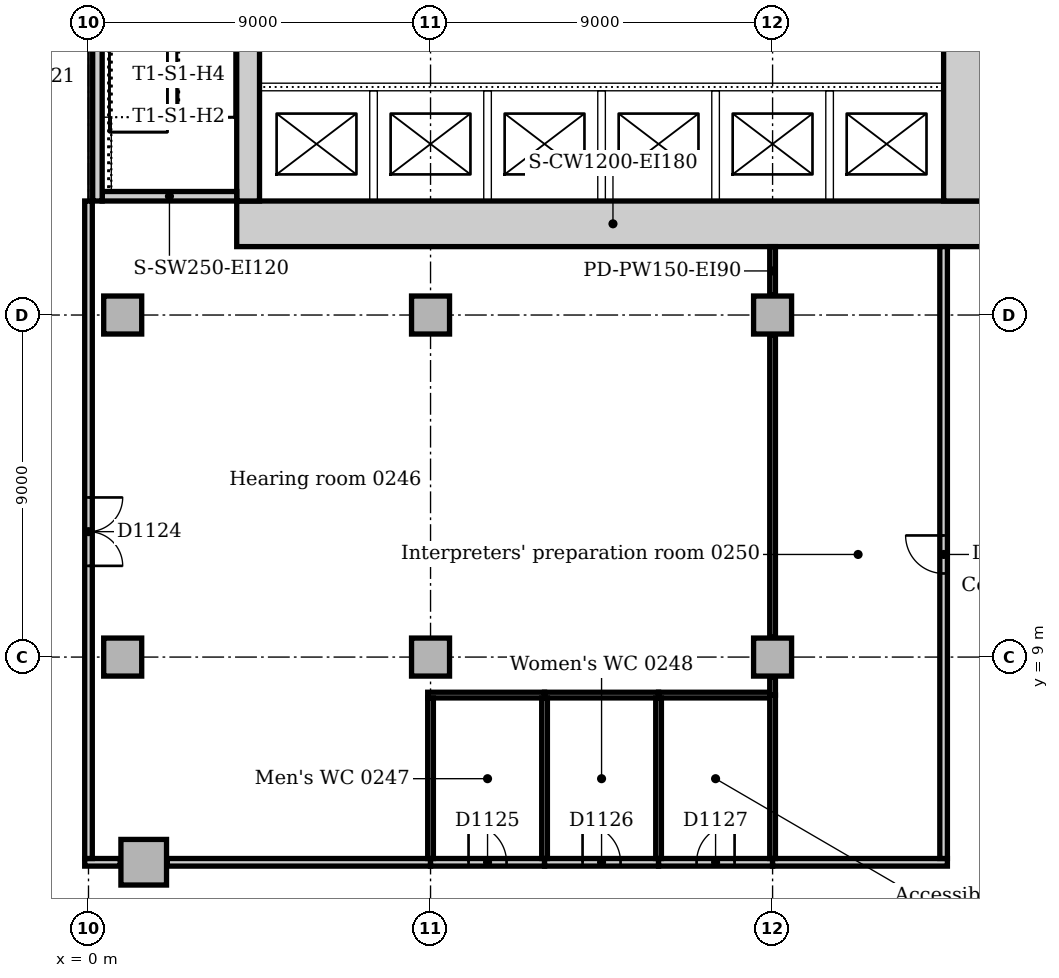
"""IFC4 building model, lengths in metres.
Left out: names, types, materials, properties, quantities, classifications, styles, units other than length and angle.
Written with IfcOpenShell. Run it as: python <this file> out.ifc"""

import sys

from ifc_helpers import new_model, si_unit, direction, frame, frame_2d, origin, origin_2d, place, context, subcontext, project, spatial, rectangle, extrude, element, fill, save


model = new_model("IFC4")
c1 = context("Model", 3, precision=1e-05, world=origin(), true_north=direction((0.0, 1.0)))
c2 = subcontext(c1, "Body", "Model", "MODEL_VIEW")
j1 = project(units=[si_unit("LENGTHUNIT", "METRE"), si_unit("PLANEANGLEUNIT", "RADIAN")], contexts=[c1])
p1 = place(None, origin())
s1 = spatial("IfcSite", under=j1, at=p1, CompositionType="ELEMENT")
p2 = place(p1, origin())
s2 = spatial("IfcBuilding", under=s1, at=p2, CompositionType="ELEMENT")
p3 = place(p2, frame((0.0, 0.0, 11.0)))
s3 = spatial("IfcBuildingStorey", under=s2, at=p3, CompositionType="ELEMENT", Elevation=11.0)
p4 = place(p3, frame((3.9, 20.4, 0.0), z_axis=(0.0, 0.0, 1.0), x_axis=(1.0, 0.0, 0.0)))
e1 = element("IfcWall", 1, at=p4, inside=s3, PredefinedType="SOLIDWALL", context=c2, shape_type="SweptSolid", body=[
    extrude(rectangle(XDim=19.8, YDim=1.2, at=frame_2d((9.9, 0.0))), origin(), (0.0, 0.0, 1.0), 5.0),
])
p5 = place(p3, frame((23.1, 21.0, 0.0), z_axis=(0.0, 0.0, 1.0), x_axis=(0.0, 1.0, 0.0)))
e2 = element("IfcWall", 2, at=p5, inside=s3, PredefinedType="SOLIDWALL", context=c2, shape_type="SweptSolid", body=[
    extrude(rectangle(XDim=10.5, YDim=1.2, at=frame_2d((5.25, 0.0))), origin(), (0.0, 0.0, 1.0), 5.0),
])
p6 = place(p5, frame((4.35, 0.0, 0.0)))
e3 = element("IfcOpeningElement", 3, at=p6, cuts=e2, PredefinedType="OPENING", context=c2, shape_type="SweptSolid", body=[
    extrude(rectangle(XDim=1.8, YDim=2.1, at=frame_2d((0.9, 1.05))), frame((0.0, 0.61, 0.0), z_axis=(0.0, -1.0, 0.0), x_axis=(1.0, 0.0, 0.0)), (0.0, 0.0, 1.0), 1.22),
])
p7 = place(p3, frame((4.2, 31.5, 0.0), z_axis=(0.0, 0.0, 1.0), x_axis=(0.0, -1.0, 0.0)))
e4 = element("IfcWall", 4, at=p7, inside=s3, PredefinedType="SOLIDWALL", context=c2, shape_type="SweptSolid", body=[
    extrude(rectangle(XDim=10.5, YDim=0.6, at=frame_2d((5.25, 0.0))), origin(), (0.0, 0.0, 1.0), 5.0),
])
p8 = place(p7, frame((4.25, 0.0, 0.0)))
e5 = element("IfcOpeningElement", 5, at=p8, cuts=e4, PredefinedType="OPENING", context=c2, shape_type="SweptSolid", body=[
    extrude(rectangle(XDim=1.0, YDim=2.1, at=frame_2d((0.5, 1.05))), frame((0.0, 0.31, 0.0), z_axis=(0.0, -1.0, 0.0), x_axis=(1.0, 0.0, 0.0)), (0.0, 0.0, 1.0), 0.62),
])
p9 = place(p3, frame((0.36, 21.125, 0.0), z_axis=(0.0, 0.0, 1.0), x_axis=(1.0, 0.0, 0.0)))
e6 = element("IfcWall", 6, at=p9, inside=s3, PredefinedType="SOLIDWALL", context=c2, shape_type="SweptSolid", body=[
    extrude(rectangle(XDim=3.54, YDim=0.25, at=frame_2d((1.77, 0.0))), origin(), (0.0, 0.0, 1.0), 5.0),
])
p10 = place(p3, frame((0.235, 21.0, 0.0), z_axis=(0.0, 0.0, 1.0), x_axis=(0.0, 1.0, 0.0)))
e7 = element("IfcWall", 7, at=p10, inside=s3, PredefinedType="SOLIDWALL", context=c2, shape_type="SweptSolid", body=[
    extrude(rectangle(XDim=21.0, YDim=0.25, at=frame_2d((10.5, 0.0))), origin(), (0.0, 0.0, 1.0), 5.0),
])
p11 = place(p3, frame((1.453, 3.602, 0.0), z_axis=(0.0, 0.0, 1.0), x_axis=(1.0, 0.0, 0.0)))
e8 = element("IfcColumn", 8, at=p11, inside=s3, PredefinedType="COLUMN", context=c2, shape_type="SweptSolid", body=[
    extrude(rectangle(XDim=1.2, YDim=1.2, at=origin_2d()), origin(), (0.0, 0.0, 1.0), 4.7),
])
for number, where, z_axis, x_axis in (
    (9, (0.9, 9.0, 0.0), (0.0, 0.0, 1.0), (1.0, 0.0, 0.0)),
    (10, (0.9, 18.0, 0.0), (0.0, 0.0, 1.0), (1.0, 0.0, 0.0)),
    (11, (9.0, 9.0, 0.0), (0.0, 0.0, 1.0), (1.0, 0.0, 0.0)),
    (12, (9.0, 18.0, 0.0), (0.0, 0.0, 1.0), (1.0, 0.0, 0.0)),
    (13, (18.0, 9.0, 0.0), (0.0, 0.0, 1.0), (1.0, 0.0, 0.0)),
    (14, (18.0, 18.0, 0.0), (0.0, 0.0, 1.0), (1.0, 0.0, 0.0)),
):
    element("IfcColumn", number, at=place(p3, frame(where, z_axis=z_axis, x_axis=x_axis)), inside=s3, PredefinedType="COLUMN", context=c2, shape_type="SweptSolid", body=[
        extrude(rectangle(XDim=1.0, YDim=1.0, at=origin_2d()), origin(), (0.0, 0.0, 1.0), 4.7),
    ])
p12 = place(p3, frame((-0.1, 3.6, 0.0), z_axis=(0.0, 0.0, 1.0), x_axis=(1.0, 0.0, 0.0)))
e15 = element("IfcWall", 15, at=p12, inside=s3, PredefinedType="PARTITIONING", context=c2, shape_type="SweptSolid", body=[
    extrude(rectangle(XDim=0.933, YDim=0.2, at=frame_2d((0.467, 0.0))), origin(), (0.0, 0.0, 1.0), 4.7),
])
p13 = place(p3, frame((2.073, 3.6, 0.0), z_axis=(0.0, 0.0, 1.0), x_axis=(1.0, 0.0, 0.0)))
e16 = element("IfcWall", 16, at=p13, inside=s3, PredefinedType="PARTITIONING", context=c2, shape_type="SweptSolid", body=[
    extrude(rectangle(XDim=6.927, YDim=0.2, at=frame_2d((3.463, 0.0))), origin(), (0.0, 0.0, 1.0), 4.7),
])
p14 = place(p3, frame((9.0, 3.6, 0.0), z_axis=(0.0, 0.0, 1.0), x_axis=(1.0, 0.0, 0.0)))
e17 = element("IfcWall", 17, at=p14, inside=s3, PredefinedType="PARTITIONING", context=c2, shape_type="SweptSolid", body=[
    extrude(rectangle(XDim=3.0, YDim=0.2, at=frame_2d((1.5, 0.0))), origin(), (0.0, 0.0, 1.0), 4.7),
])
p15 = place(p14, frame((1.0, 0.0, 0.0)))
e18 = element("IfcOpeningElement", 18, at=p15, cuts=e17, PredefinedType="OPENING", context=c2, shape_type="SweptSolid", body=[
    extrude(rectangle(XDim=1.0, YDim=2.1, at=frame_2d((0.5, 1.05))), frame((0.0, 0.11, 0.0), z_axis=(0.0, -1.0, 0.0), x_axis=(1.0, 0.0, 0.0)), (0.0, 0.0, 1.0), 0.22),
])
p16 = place(p3, frame((12.0, 3.6, 0.0), z_axis=(0.0, 0.0, 1.0), x_axis=(1.0, 0.0, 0.0)))
e19 = element("IfcWall", 19, at=p16, inside=s3, PredefinedType="PARTITIONING", context=c2, shape_type="SweptSolid", body=[
    extrude(rectangle(XDim=3.0, YDim=0.2, at=frame_2d((1.5, 0.0))), origin(), (0.0, 0.0, 1.0), 4.7),
])
p17 = place(p16, frame((1.0, 0.0, 0.0)))
e20 = element("IfcOpeningElement", 20, at=p17, cuts=e19, PredefinedType="OPENING", context=c2, shape_type="SweptSolid", body=[
    extrude(rectangle(XDim=1.0, YDim=2.1, at=frame_2d((0.5, 1.05))), frame((0.0, 0.11, 0.0), z_axis=(0.0, -1.0, 0.0), x_axis=(1.0, 0.0, 0.0)), (0.0, 0.0, 1.0), 0.22),
])
p18 = place(p3, frame((15.0, 3.6, 0.0), z_axis=(0.0, 0.0, 1.0), x_axis=(1.0, 0.0, 0.0)))
e21 = element("IfcWall", 21, at=p18, inside=s3, PredefinedType="PARTITIONING", context=c2, shape_type="SweptSolid", body=[
    extrude(rectangle(XDim=3.0, YDim=0.2, at=frame_2d((1.5, 0.0))), origin(), (0.0, 0.0, 1.0), 4.7),
])
p19 = place(p18, frame((1.0, 0.0, 0.0)))
e22 = element("IfcOpeningElement", 22, at=p19, cuts=e21, PredefinedType="OPENING", context=c2, shape_type="SweptSolid", body=[
    extrude(rectangle(XDim=1.0, YDim=2.1, at=frame_2d((0.5, 1.05))), frame((0.0, 0.11, 0.0), z_axis=(0.0, -1.0, 0.0), x_axis=(1.0, 0.0, 0.0)), (0.0, 0.0, 1.0), 0.22),
])
p20 = place(p3, frame((18.0, 3.6, 0.0), z_axis=(0.0, 0.0, 1.0), x_axis=(1.0, 0.0, 0.0)))
e23 = element("IfcWall", 23, at=p20, inside=s3, PredefinedType="PARTITIONING", context=c2, shape_type="SweptSolid", body=[
    extrude(rectangle(XDim=4.6, YDim=0.2, at=frame_2d((2.3, 0.0))), origin(), (0.0, 0.0, 1.0), 4.7),
])
p21 = place(p3, frame((22.5, 3.7, 0.0), z_axis=(0.0, 0.0, 1.0), x_axis=(0.0, 1.0, 0.0)))
e24 = element("IfcWall", 24, at=p21, inside=s3, PredefinedType="PARTITIONING", context=c2, shape_type="SweptSolid", body=[
    extrude(rectangle(XDim=16.1, YDim=0.2, at=frame_2d((8.05, 0.0))), origin(), (0.0, 0.0, 1.0), 4.7),
])
p22 = place(p21, frame((7.5, 0.0, 0.0)))
e25 = element("IfcOpeningElement", 25, at=p22, cuts=e24, PredefinedType="OPENING", context=c2, shape_type="SweptSolid", body=[
    extrude(rectangle(XDim=1.0, YDim=2.1, at=frame_2d((0.5, 1.05))), frame((0.0, 0.11, 0.0), z_axis=(0.0, -1.0, 0.0), x_axis=(1.0, 0.0, 0.0)), (0.0, 0.0, 1.0), 0.22),
])
p23 = place(p3, frame((0.0, 3.7, 0.0), z_axis=(0.0, 0.0, 1.0), x_axis=(0.0, 1.0, 0.0)))
e26 = element("IfcWall", 26, at=p23, inside=s3, PredefinedType="PARTITIONING", context=c2, shape_type="SweptSolid", body=[
    extrude(rectangle(XDim=17.3, YDim=0.2, at=frame_2d((8.65, 0.0))), origin(), (0.0, 0.0, 1.0), 4.7),
])
p24 = place(p23, frame((7.7, 0.0, 0.0)))
e27 = element("IfcOpeningElement", 27, at=p24, cuts=e26, PredefinedType="OPENING", context=c2, shape_type="SweptSolid", body=[
    extrude(rectangle(XDim=1.8, YDim=2.1, at=frame_2d((0.9, 1.05))), frame((0.0, 0.11, 0.0), z_axis=(0.0, -1.0, 0.0), x_axis=(1.0, 0.0, 0.0)), (0.0, 0.0, 1.0), 0.22),
])
p25 = place(p3, frame((8.925, 8.0, 0.0), z_axis=(0.0, 0.0, 1.0), x_axis=(1.0, 0.0, 0.0)))
e28 = element("IfcWall", 28, at=p25, inside=s3, PredefinedType="PARTITIONING", context=c2, shape_type="SweptSolid", body=[
    extrude(rectangle(XDim=3.075, YDim=0.15, at=frame_2d((1.538, 0.0))), origin(), (0.0, 0.0, 1.0), 4.7),
])
p26 = place(p3, frame((9.0, 3.7, 0.0), z_axis=(0.0, 0.0, 1.0), x_axis=(0.0, 1.0, 0.0)))
e29 = element("IfcWall", 29, at=p26, inside=s3, PredefinedType="PARTITIONING", context=c2, shape_type="SweptSolid", body=[
    extrude(rectangle(XDim=4.225, YDim=0.15, at=frame_2d((2.112, 0.0))), origin(), (0.0, 0.0, 1.0), 4.7),
])
p27 = place(p3, frame((12.0, 8.0, 0.0), z_axis=(0.0, 0.0, 1.0), x_axis=(1.0, 0.0, 0.0)))
e30 = element("IfcWall", 30, at=p27, inside=s3, PredefinedType="PARTITIONING", context=c2, shape_type="SweptSolid", body=[
    extrude(rectangle(XDim=3.0, YDim=0.15, at=frame_2d((1.5, 0.0))), origin(), (0.0, 0.0, 1.0), 4.7),
])
p28 = place(p3, frame((15.0, 8.0, 0.0), z_axis=(0.0, 0.0, 1.0), x_axis=(1.0, 0.0, 0.0)))
e31 = element("IfcWall", 31, at=p28, inside=s3, PredefinedType="PARTITIONING", context=c2, shape_type="SweptSolid", body=[
    extrude(rectangle(XDim=2.925, YDim=0.15, at=frame_2d((1.462, 0.0))), origin(), (0.0, 0.0, 1.0), 4.7),
])
p29 = place(p3, frame((18.0, 8.0, 0.0), z_axis=(0.0, 0.0, 1.0), x_axis=(0.0, 1.0, 0.0)))
e32 = element("IfcWall", 32, at=p29, inside=s3, PredefinedType="PARTITIONING", context=c2, shape_type="SweptSolid", body=[
    extrude(rectangle(XDim=0.48, YDim=0.15, at=frame_2d((0.24, 0.0))), origin(), (0.0, 0.0, 1.0), 4.7),
])
p30 = place(p3, frame((18.0, 9.52, 0.0), z_axis=(0.0, 0.0, 1.0), x_axis=(0.0, 1.0, 0.0)))
e33 = element("IfcWall", 33, at=p30, inside=s3, PredefinedType="PARTITIONING", context=c2, shape_type="SweptSolid", body=[
    extrude(rectangle(XDim=7.96, YDim=0.15, at=frame_2d((3.98, 0.0))), origin(), (0.0, 0.0, 1.0), 4.7),
])
p31 = place(p3, frame((18.0, 18.52, 0.0), z_axis=(0.0, 0.0, 1.0), x_axis=(0.0, 1.0, 0.0)))
e34 = element("IfcWall", 34, at=p31, inside=s3, PredefinedType="PARTITIONING", context=c2, shape_type="SweptSolid", body=[
    extrude(rectangle(XDim=1.28, YDim=0.15, at=frame_2d((0.64, 0.0))), origin(), (0.0, 0.0, 1.0), 4.7),
])
for number, where, z_axis, x_axis in (
    (35, (12.0, 3.7, 0.0), (0.0, 0.0, 1.0), (0.0, 1.0, 0.0)),
    (36, (15.0, 3.7, 0.0), (0.0, 0.0, 1.0), (0.0, 1.0, 0.0)),
):
    element("IfcWall", number, at=place(p3, frame(where, z_axis=z_axis, x_axis=x_axis)), inside=s3, PredefinedType="PARTITIONING", context=c2, shape_type="SweptSolid", body=[
        extrude(rectangle(XDim=4.225, YDim=0.15, at=frame_2d((2.112, 0.0))), origin(), (0.0, 0.0, 1.0), 4.7),
    ])
p32 = place(p3, frame((18.0, 3.7, 0.0), z_axis=(0.0, 0.0, 1.0), x_axis=(0.0, 1.0, 0.0)))
e37 = element("IfcWall", 37, at=p32, inside=s3, PredefinedType="PARTITIONING", context=c2, shape_type="SweptSolid", body=[
    extrude(rectangle(XDim=4.3, YDim=0.15, at=frame_2d((2.15, 0.0))), origin(), (0.0, 0.0, 1.0), 4.7),
])
p33 = place(p3, frame((0.48, 21.25, 0.0), z_axis=(0.0, 0.0, 1.0), x_axis=(0.0, 1.0, 0.0)))
e38 = element("IfcWall", 38, at=p33, inside=s3, PredefinedType="STANDARD", context=c2, shape_type="SweptSolid", body=[
    extrude(rectangle(XDim=1.955, YDim=0.24, at=frame_2d((0.978, 0.0))), origin(), (0.0, 0.0, 1.0), 5.0),
])
p34 = place(p3, frame((4.5, 24.0, 0.0), z_axis=(0.0, 0.0, 1.0), x_axis=(1.0, 0.0, 0.0)))
e39 = element("IfcWall", 39, at=p34, inside=s3, PredefinedType="PARTITIONING", context=c2, shape_type="SweptSolid", body=[
    extrude(rectangle(XDim=18.0, YDim=0.2, at=frame_2d((9.0, 0.0))), origin(), (0.0, 0.0, 1.0), 4.7),
])
p35 = place(p34, frame((0.95, 0.0, 0.0)))
e40 = element("IfcOpeningElement", 40, at=p35, cuts=e39, PredefinedType="OPENING", context=c2, shape_type="SweptSolid", body=[
    extrude(rectangle(XDim=1.1, YDim=2.1, at=frame_2d((0.55, 1.05))), frame((0.0, 0.11, 0.0), z_axis=(0.0, -1.0, 0.0), x_axis=(1.0, 0.0, 0.0)), (0.0, 0.0, 1.0), 0.22),
])
p36 = place(p34, frame((3.95, 0.0, 0.0)))
e41 = element("IfcOpeningElement", 41, at=p36, cuts=e39, PredefinedType="OPENING", context=c2, shape_type="SweptSolid", body=[
    extrude(rectangle(XDim=1.1, YDim=2.1, at=frame_2d((0.55, 1.05))), frame((0.0, 0.11, 0.0), z_axis=(0.0, -1.0, 0.0), x_axis=(1.0, 0.0, 0.0)), (0.0, 0.0, 1.0), 0.22),
])
p37 = place(p34, frame((6.95, 0.0, 0.0)))
e42 = element("IfcOpeningElement", 42, at=p37, cuts=e39, PredefinedType="OPENING", context=c2, shape_type="SweptSolid", body=[
    extrude(rectangle(XDim=1.1, YDim=2.1, at=frame_2d((0.55, 1.05))), frame((0.0, 0.11, 0.0), z_axis=(0.0, -1.0, 0.0), x_axis=(1.0, 0.0, 0.0)), (0.0, 0.0, 1.0), 0.22),
])
p38 = place(p34, frame((9.95, 0.0, 0.0)))
e43 = element("IfcOpeningElement", 43, at=p38, cuts=e39, PredefinedType="OPENING", context=c2, shape_type="SweptSolid", body=[
    extrude(rectangle(XDim=1.1, YDim=2.1, at=frame_2d((0.55, 1.05))), frame((0.0, 0.11, 0.0), z_axis=(0.0, -1.0, 0.0), x_axis=(1.0, 0.0, 0.0)), (0.0, 0.0, 1.0), 0.22),
])
p39 = place(p34, frame((12.95, 0.0, 0.0)))
e44 = element("IfcOpeningElement", 44, at=p39, cuts=e39, PredefinedType="OPENING", context=c2, shape_type="SweptSolid", body=[
    extrude(rectangle(XDim=1.1, YDim=2.1, at=frame_2d((0.55, 1.05))), frame((0.0, 0.11, 0.0), z_axis=(0.0, -1.0, 0.0), x_axis=(1.0, 0.0, 0.0)), (0.0, 0.0, 1.0), 0.22),
])
p40 = place(p34, frame((15.95, 0.0, 0.0)))
e45 = element("IfcOpeningElement", 45, at=p40, cuts=e39, PredefinedType="OPENING", context=c2, shape_type="SweptSolid", body=[
    extrude(rectangle(XDim=1.1, YDim=2.1, at=frame_2d((0.55, 1.05))), frame((0.0, 0.11, 0.0), z_axis=(0.0, -1.0, 0.0), x_axis=(1.0, 0.0, 0.0)), (0.0, 0.0, 1.0), 0.22),
])
for number, where, z_axis, x_axis in (
    (46, (7.5, 21.0, 0.0), (0.0, 0.0, 1.0), (0.0, 1.0, 0.0)),
    (47, (10.5, 21.0, 0.0), (0.0, 0.0, 1.0), (0.0, 1.0, 0.0)),
    (48, (13.5, 21.0, 0.0), (0.0, 0.0, 1.0), (0.0, 1.0, 0.0)),
    (49, (16.5, 21.0, 0.0), (0.0, 0.0, 1.0), (0.0, 1.0, 0.0)),
    (50, (19.5, 21.0, 0.0), (0.0, 0.0, 1.0), (0.0, 1.0, 0.0)),
):
    element("IfcWall", number, at=place(p3, frame(where, z_axis=z_axis, x_axis=x_axis)), inside=s3, PredefinedType="PARTITIONING", context=c2, shape_type="SweptSolid", body=[
        extrude(rectangle(XDim=2.9, YDim=0.2, at=frame_2d((1.45, 0.0))), origin(), (0.0, 0.0, 1.0), 4.7),
    ])
p41 = place(p24, frame((1.8, 0.0, 0.0), z_axis=(0.0, 0.0, 1.0), x_axis=(-1.0, 0.0, 0.0)))
e51 = element("IfcDoor", 51, at=p41, inside=s3, OperationType="DOUBLE_DOOR_SINGLE_SWING", PredefinedType="DOOR", context=c2, shape_type="SweptSolid", body=[
    extrude(rectangle(XDim=1.8, YDim=2.1, at=frame_2d((0.9, 1.05))), frame((0.0, 0.025, 0.0), z_axis=(0.0, -1.0, 0.0), x_axis=(1.0, 0.0, 0.0)), (0.0, 0.0, 1.0), 0.05),
])
fill(e27, e51)
p42 = place(p15, origin())
e52 = element("IfcDoor", 52, at=p42, inside=s3, OperationType="SINGLE_SWING_LEFT", PredefinedType="DOOR", context=c2, shape_type="SweptSolid", body=[
    extrude(rectangle(XDim=1.0, YDim=2.1, at=frame_2d((0.5, 1.05))), frame((0.0, 0.025, 0.0), z_axis=(0.0, -1.0, 0.0), x_axis=(1.0, 0.0, 0.0)), (0.0, 0.0, 1.0), 0.05),
])
fill(e18, e52)
p43 = place(p17, origin())
e53 = element("IfcDoor", 53, at=p43, inside=s3, OperationType="SINGLE_SWING_LEFT", PredefinedType="DOOR", context=c2, shape_type="SweptSolid", body=[
    extrude(rectangle(XDim=1.0, YDim=2.1, at=frame_2d((0.5, 1.05))), frame((0.0, 0.025, 0.0), z_axis=(0.0, -1.0, 0.0), x_axis=(1.0, 0.0, 0.0)), (0.0, 0.0, 1.0), 0.05),
])
fill(e20, e53)
p44 = place(p19, origin())
e54 = element("IfcDoor", 54, at=p44, inside=s3, OperationType="SINGLE_SWING_RIGHT", PredefinedType="DOOR", context=c2, shape_type="SweptSolid", body=[
    extrude(rectangle(XDim=1.0, YDim=2.1, at=frame_2d((0.5, 1.05))), frame((0.0, 0.025, 0.0), z_axis=(0.0, -1.0, 0.0), x_axis=(1.0, 0.0, 0.0)), (0.0, 0.0, 1.0), 0.05),
])
fill(e22, e54)
p45 = place(p22, origin())
e55 = element("IfcDoor", 55, at=p45, inside=s3, OperationType="SINGLE_SWING_RIGHT", PredefinedType="DOOR", context=c2, shape_type="SweptSolid", body=[
    extrude(rectangle(XDim=1.0, YDim=2.1, at=frame_2d((0.5, 1.05))), frame((0.0, 0.025, 0.0), z_axis=(0.0, -1.0, 0.0), x_axis=(1.0, 0.0, 0.0)), (0.0, 0.0, 1.0), 0.05),
])
fill(e25, e55)
p46 = place(p35, origin())
e56 = element("IfcDoor", 56, at=p46, inside=s3, OperationType="SLIDING_TO_LEFT", PredefinedType="DOOR", context=c2, shape_type="SweptSolid", body=[
    extrude(rectangle(XDim=1.1, YDim=2.1, at=frame_2d((0.55, 1.05))), frame((0.0, 0.025, 0.0), z_axis=(0.0, -1.0, 0.0), x_axis=(1.0, 0.0, 0.0)), (0.0, 0.0, 1.0), 0.05),
])
fill(e40, e56)
p47 = place(p36, origin())
e57 = element("IfcDoor", 57, at=p47, inside=s3, OperationType="SLIDING_TO_LEFT", PredefinedType="DOOR", context=c2, shape_type="SweptSolid", body=[
    extrude(rectangle(XDim=1.1, YDim=2.1, at=frame_2d((0.55, 1.05))), frame((0.0, 0.025, 0.0), z_axis=(0.0, -1.0, 0.0), x_axis=(1.0, 0.0, 0.0)), (0.0, 0.0, 1.0), 0.05),
])
fill(e41, e57)
p48 = place(p37, origin())
e58 = element("IfcDoor", 58, at=p48, inside=s3, OperationType="SLIDING_TO_LEFT", PredefinedType="DOOR", context=c2, shape_type="SweptSolid", body=[
    extrude(rectangle(XDim=1.1, YDim=2.1, at=frame_2d((0.55, 1.05))), frame((0.0, 0.025, 0.0), z_axis=(0.0, -1.0, 0.0), x_axis=(1.0, 0.0, 0.0)), (0.0, 0.0, 1.0), 0.05),
])
fill(e42, e58)
p49 = place(p38, origin())
e59 = element("IfcDoor", 59, at=p49, inside=s3, OperationType="SLIDING_TO_LEFT", PredefinedType="DOOR", context=c2, shape_type="SweptSolid", body=[
    extrude(rectangle(XDim=1.1, YDim=2.1, at=frame_2d((0.55, 1.05))), frame((0.0, 0.025, 0.0), z_axis=(0.0, -1.0, 0.0), x_axis=(1.0, 0.0, 0.0)), (0.0, 0.0, 1.0), 0.05),
])
fill(e43, e59)
p50 = place(p39, origin())
e60 = element("IfcDoor", 60, at=p50, inside=s3, OperationType="SLIDING_TO_LEFT", PredefinedType="DOOR", context=c2, shape_type="SweptSolid", body=[
    extrude(rectangle(XDim=1.1, YDim=2.1, at=frame_2d((0.55, 1.05))), frame((0.0, 0.025, 0.0), z_axis=(0.0, -1.0, 0.0), x_axis=(1.0, 0.0, 0.0)), (0.0, 0.0, 1.0), 0.05),
])
fill(e44, e60)
p51 = place(p40, origin())
e61 = element("IfcDoor", 61, at=p51, inside=s3, OperationType="SLIDING_TO_LEFT", PredefinedType="DOOR", context=c2, shape_type="SweptSolid", body=[
    extrude(rectangle(XDim=1.1, YDim=2.1, at=frame_2d((0.55, 1.05))), frame((0.0, 0.025, 0.0), z_axis=(0.0, -1.0, 0.0), x_axis=(1.0, 0.0, 0.0)), (0.0, 0.0, 1.0), 0.05),
])
fill(e45, e61)
save(model, sys.argv[1])
